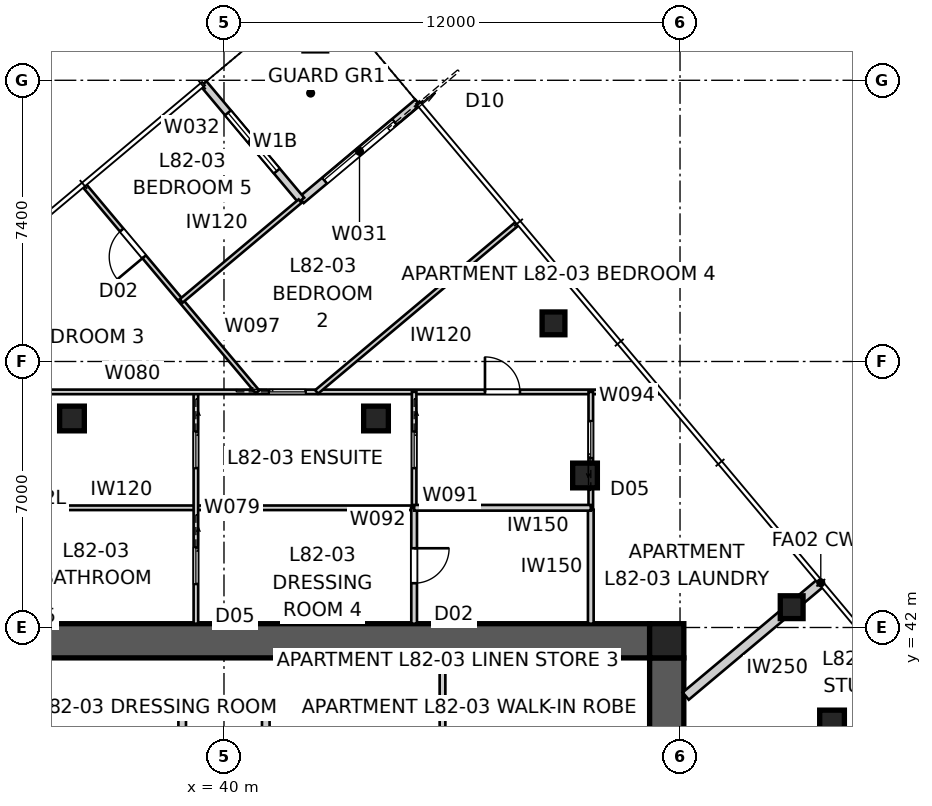
"""IFC4 building model, lengths in metres.
Left out: names, types, materials, properties, quantities, classifications, styles, units other than length and angle.
Written with IfcOpenShell. Run it as: python <this file> out.ifc"""

import sys

from ifc_helpers import new_model, si_unit, direction, frame, frame_2d, origin, origin_2d, place, context, subcontext, project, spatial, polyline, rectangle, outline, extrude, element, fill, save


model = new_model("IFC4")
c1 = context("Model", 3, precision=1e-05, world=origin(), true_north=direction((0.0, 1.0)))
c2 = subcontext(c1, "Body", "Model", "MODEL_VIEW")
j1 = project(units=[si_unit("LENGTHUNIT", "METRE"), si_unit("PLANEANGLEUNIT", "RADIAN")], contexts=[c1])
p1 = place(None, origin())
s1 = spatial("IfcSite", under=j1, at=p1, CompositionType="ELEMENT")
p2 = place(p1, origin())
s2 = spatial("IfcBuilding", under=s1, at=p2, CompositionType="ELEMENT")
p3 = place(p2, frame((0.0, 0.0, 296.4)))
s3 = spatial("IfcBuildingStorey", under=s2, at=p3, CompositionType="ELEMENT", Elevation=296.4)
p4 = place(p3, frame((28.8, 41.65, 0.0), z_axis=(0.0, 0.0, 1.0), x_axis=(1.0, 0.0, 0.0)))
e1 = element("IfcWall", 1, at=p4, inside=s3, PredefinedType="SHEAR", context=c2, shape_type="SweptSolid", body=[
    extrude(outline(polyline([(0.0, -0.45), (22.4, -0.45), (22.4, -0.025), (22.85, -0.025), (22.85, 0.025), (22.4, 0.025), (22.4, 0.45), (0.0, 0.45), (0.0, 0.025), (-0.45, 0.025), (-0.45, -0.025), (0.0, -0.025), (0.0, -0.45)])), origin(), (0.0, 0.0, 1.0), 3.4),
])
p5 = place(p3, frame((51.65, 18.8, 0.0), z_axis=(0.0, 0.0, 1.0), x_axis=(0.0, 1.0, 0.0)))
e2 = element("IfcWall", 2, at=p5, inside=s3, PredefinedType="SHEAR", context=c2, shape_type="SweptSolid", body=[
    extrude(outline(polyline([(0.0, -0.45), (22.4, -0.45), (22.4, -0.025), (22.85, -0.025), (22.85, 0.025), (22.4, 0.025), (22.4, 0.45), (0.0, 0.45), (0.0, 0.025), (-0.45, 0.025), (-0.45, -0.025), (0.0, -0.025), (0.0, -0.45)])), origin(), (0.0, 0.0, 1.0), 3.4),
])
p6 = place(p5, frame((11.14, 0.0, 0.0)))
e3 = element("IfcOpeningElement", 3, at=p6, cuts=e2, PredefinedType="OPENING", context=c2, shape_type="SweptSolid", body=[
    extrude(rectangle(XDim=1.02, YDim=2.4, at=frame_2d((0.51, 1.2))), frame((0.0, 0.46, 0.0), z_axis=(0.0, -1.0, 0.0), x_axis=(1.0, 0.0, 0.0)), (0.0, 0.0, 1.0), 0.92),
])
for number, where, z_axis, x_axis in (
    (4, (38.9, 37.6, 0.0), (0.0, 0.0, 1.0), (0.0, 1.0, 0.0)),
    (5, (41.1, 37.6, 0.0), (0.0, 0.0, 1.0), (0.0, 1.0, 0.0)),
):
    element("IfcWall", number, at=place(p3, frame(where, z_axis=z_axis, x_axis=x_axis)), inside=s3, PredefinedType="SOLIDWALL", context=c2, shape_type="SweptSolid", body=[
        extrude(rectangle(XDim=2.0, YDim=0.2, at=frame_2d((1.0, 0.0))), origin(), (0.0, 0.0, 1.0), 3.4),
    ])
p7 = place(p3, frame((38.8, 39.7, 0.0), z_axis=(0.0, 0.0, 1.0), x_axis=(1.0, 0.0, 0.0)))
e6 = element("IfcWall", 6, at=p7, inside=s3, PredefinedType="SOLIDWALL", context=c2, shape_type="SweptSolid", body=[
    extrude(rectangle(XDim=2.4, YDim=0.2, at=frame_2d((1.2, 0.0))), origin(), (0.0, 0.0, 1.0), 3.4),
])
p8 = place(p3, frame((51.65, 41.65, 0.0), z_axis=(0.0, 0.0, 1.0), x_axis=(1.0, 0.0, 0.0)))
e7 = element("IfcColumn", 7, at=p8, inside=s3, PredefinedType="COLUMN", context=c2, shape_type="SweptSolid", body=[
    extrude(rectangle(XDim=0.9, YDim=0.9, at=origin_2d()), origin(), (0.0, 0.0, 1.0), 3.4),
])
for number, where, z_axis, x_axis in (
    (8, (54.938, 42.534, 0.0), (0.0, 0.0, 1.0), (1.0, 0.0, 0.0)),
    (9, (48.671, 50.003, 0.0), (0.0, 0.0, 1.0), (1.0, 0.0, 0.0)),
):
    element("IfcColumn", number, at=place(p3, frame(where, z_axis=z_axis, x_axis=x_axis)), inside=s3, PredefinedType="COLUMN", context=c2, shape_type="SweptSolid", body=[
        extrude(rectangle(XDim=0.6, YDim=0.6, at=origin_2d()), origin(), (0.0, 0.0, 1.0), 3.4),
    ])
for number, where, z_axis, x_axis in (
    (10, (56.0, 39.5, 0.0), (0.0, 0.0, 1.0), (1.0, 0.0, 0.0)),
    (11, (49.5, 46.0, 0.0), (0.0, 0.0, 1.0), (1.0, 0.0, 0.0)),
    (12, (44.0, 47.5, 0.0), (0.0, 0.0, 1.0), (1.0, 0.0, 0.0)),
    (13, (36.0, 47.5, 0.0), (0.0, 0.0, 1.0), (1.0, 0.0, 0.0)),
):
    element("IfcColumn", number, at=place(p3, frame(where, z_axis=z_axis, x_axis=x_axis)), inside=s3, PredefinedType="COLUMN", context=c2, shape_type="SweptSolid", body=[
        extrude(rectangle(XDim=0.65, YDim=0.65, at=origin_2d()), origin(), (0.0, 0.0, 1.0), 3.4),
    ])
p9 = place(p3, frame((45.098, 55.817, 0.0), z_axis=(0.0, 0.0, 1.0), x_axis=(-0.766060656284, -0.642768287094, 0.0)))
e14 = element("IfcWall", 14, at=p9, inside=s3, PredefinedType="SOLIDWALL", context=c2, shape_type="SweptSolid", body=[
    extrude(rectangle(XDim=4.0, YDim=0.2, at=frame_2d((2.0, 0.0))), origin(), (0.0, 0.0, 1.0), 3.2),
])
p10 = place(p9, frame((0.8, 0.0, 0.0)))
e15 = element("IfcOpeningElement", 15, at=p10, cuts=e14, PredefinedType="OPENING", context=c2, shape_type="SweptSolid", body=[
    extrude(rectangle(XDim=2.4, YDim=2.4, at=frame_2d((1.2, 1.2))), frame((0.0, 0.11, 0.0), z_axis=(0.0, -1.0, 0.0), x_axis=(1.0, 0.0, 0.0)), (0.0, 0.0, 1.0), 0.22),
])
p11 = place(p3, frame((42.034, 53.246, 0.0), z_axis=(0.0, 0.0, 1.0), x_axis=(-0.642798342015, 0.766035437498, 0.0)))
e16 = element("IfcWall", 16, at=p11, inside=s3, PredefinedType="SOLIDWALL", context=c2, shape_type="SweptSolid", body=[
    extrude(rectangle(XDim=4.0, YDim=0.2, at=frame_2d((2.0, 0.0))), origin(), (0.0, 0.0, 1.0), 3.2),
])
p12 = place(p11, frame((1.0, 0.0, 0.45)))
e17 = element("IfcOpeningElement", 17, at=p12, cuts=e16, PredefinedType="OPENING", context=c2, shape_type="SweptSolid", body=[
    extrude(rectangle(XDim=2.0, YDim=1.8, at=frame_2d((1.0, 0.9))), frame((0.0, 0.11, 0.0), z_axis=(0.0, -1.0, 0.0), x_axis=(1.0, 0.0, 0.0)), (0.0, 0.0, 1.0), 0.22),
])
p13 = place(p3, frame((55.704, 43.177, 0.0), z_axis=(0.0, 0.0, 1.0), x_axis=(-0.76603440109, -0.64279957712, 0.0)))
e18 = element("IfcWall", 18, at=p13, inside=s3, PredefinedType="PARTITIONING", context=c2, shape_type="SweptSolid", body=[
    extrude(rectangle(XDim=4.64, YDim=0.25, at=frame_2d((2.32, 0.0))), origin(), (0.0, 0.0, 1.0), 3.2),
])
p14 = place(p3, frame((45.75, 41.2, 0.0), z_axis=(0.0, 0.0, 1.0), x_axis=(0.0, -1.0, 0.0)))
e19 = element("IfcWall", 19, at=p14, inside=s3, PredefinedType="SOLIDWALL", context=c2, shape_type="SweptSolid", body=[
    extrude(rectangle(XDim=5.9, YDim=0.15, at=frame_2d((2.95, 0.0))), origin(), (0.0, 0.0, 1.0), 3.2),
])
p15 = place(p3, frame((34.0, 45.15, 0.0), z_axis=(0.0, 0.0, 1.0), x_axis=(1.0, 0.0, 0.0)))
e20 = element("IfcWall", 20, at=p15, inside=s3, PredefinedType="PARTITIONING", context=c2, shape_type="SweptSolid", body=[
    extrude(rectangle(XDim=11.003, YDim=0.12, at=frame_2d((5.501, 0.0))), origin(), (0.0, 0.0, 1.0), 3.2),
])
p16 = place(p3, frame((39.26, 48.2, 0.0), z_axis=(0.0, 0.0, 1.0), x_axis=(0.0, -1.0, 0.0)))
e21 = element("IfcWall", 21, at=p16, inside=s3, PredefinedType="PARTITIONING", context=c2, shape_type="SweptSolid", body=[
    extrude(rectangle(XDim=6.1, YDim=0.12, at=frame_2d((3.05, 0.0))), origin(), (0.0, 0.0, 1.0), 3.2),
])
p17 = place(p16, frame((1.045, 0.0, 0.0)))
e22 = element("IfcOpeningElement", 22, at=p17, cuts=e21, PredefinedType="OPENING", context=c2, shape_type="SweptSolid", body=[
    extrude(rectangle(XDim=0.96, YDim=2.1, at=frame_2d((0.48, 1.05))), frame((0.0, 0.07, 0.0), z_axis=(0.0, -1.0, 0.0), x_axis=(1.0, 0.0, 0.0)), (0.0, 0.0, 1.0), 0.14),
])
p18 = place(p16, frame((4.095, 0.0, 0.0)))
e23 = element("IfcOpeningElement", 23, at=p18, cuts=e21, PredefinedType="OPENING", context=c2, shape_type="SweptSolid", body=[
    extrude(rectangle(XDim=0.96, YDim=2.1, at=frame_2d((0.48, 1.05))), frame((0.0, 0.07, 0.0), z_axis=(0.0, -1.0, 0.0), x_axis=(1.0, 0.0, 0.0)), (0.0, 0.0, 1.0), 0.14),
])
p19 = place(p3, frame((34.0, 48.2, 0.0), z_axis=(0.0, 0.0, 1.0), x_axis=(1.0, 0.0, 0.0)))
e24 = element("IfcWall", 24, at=p19, inside=s3, PredefinedType="PARTITIONING", context=c2, shape_type="SweptSolid", body=[
    extrude(rectangle(XDim=17.437, YDim=0.12, at=frame_2d((8.718, 0.0))), origin(), (0.0, 0.0, 1.0), 3.2),
])
p20 = place(p19, frame((7.186, 0.0, 0.0)))
e25 = element("IfcOpeningElement", 25, at=p20, cuts=e24, PredefinedType="OPENING", context=c2, shape_type="SweptSolid", body=[
    extrude(rectangle(XDim=0.96, YDim=2.1, at=frame_2d((0.48, 1.05))), frame((0.0, 0.07, 0.0), z_axis=(0.0, -1.0, 0.0), x_axis=(1.0, 0.0, 0.0)), (0.0, 0.0, 1.0), 0.14),
])
p21 = place(p19, frame((12.867, 0.0, 0.0)))
e26 = element("IfcOpeningElement", 26, at=p21, cuts=e24, PredefinedType="OPENING", context=c2, shape_type="SweptSolid", body=[
    extrude(rectangle(XDim=0.92, YDim=2.34, at=frame_2d((0.46, 1.17))), frame((0.0, 0.07, 0.0), z_axis=(0.0, -1.0, 0.0), x_axis=(1.0, 0.0, 0.0)), (0.0, 0.0, 1.0), 0.14),
])
p22 = place(p3, frame((45.003, 48.2, 0.0), z_axis=(0.0, 0.0, 1.0), x_axis=(0.0, -1.0, 0.0)))
e27 = element("IfcWall", 27, at=p22, inside=s3, PredefinedType="PARTITIONING", context=c2, shape_type="SweptSolid", body=[
    extrude(rectangle(XDim=3.05, YDim=0.12, at=frame_2d((1.525, 0.0))), origin(), (0.0, 0.0, 1.0), 3.2),
])
p23 = place(p22, frame((1.045, 0.0, 0.0)))
e28 = element("IfcOpeningElement", 28, at=p23, cuts=e27, PredefinedType="OPENING", context=c2, shape_type="SweptSolid", body=[
    extrude(rectangle(XDim=0.96, YDim=2.1, at=frame_2d((0.48, 1.05))), frame((0.0, 0.07, 0.0), z_axis=(0.0, -1.0, 0.0), x_axis=(1.0, 0.0, 0.0)), (0.0, 0.0, 1.0), 0.14),
])
p24 = place(p3, frame((45.003, 45.15, 0.0), z_axis=(0.0, 0.0, 1.0), x_axis=(0.0, -1.0, 0.0)))
e29 = element("IfcWall", 29, at=p24, inside=s3, PredefinedType="SOLIDWALL", context=c2, shape_type="SweptSolid", body=[
    extrude(rectangle(XDim=3.05, YDim=0.15, at=frame_2d((1.525, 0.0))), origin(), (0.0, 0.0, 1.0), 3.2),
])
p25 = place(p24, frame((1.065, 0.0, 0.0)))
e30 = element("IfcOpeningElement", 30, at=p25, cuts=e29, PredefinedType="OPENING", context=c2, shape_type="SweptSolid", body=[
    extrude(rectangle(XDim=0.92, YDim=2.34, at=frame_2d((0.46, 1.17))), frame((0.0, 0.085, 0.0), z_axis=(0.0, -1.0, 0.0), x_axis=(1.0, 0.0, 0.0)), (0.0, 0.0, 1.0), 0.17),
])
p26 = place(p3, frame((49.652, 42.1, 0.0), z_axis=(0.0, 0.0, 1.0), x_axis=(0.0, 1.0, 0.0)))
e31 = element("IfcWall", 31, at=p26, inside=s3, PredefinedType="SOLIDWALL", context=c2, shape_type="SweptSolid", body=[
    extrude(rectangle(XDim=3.0, YDim=0.15, at=frame_2d((1.5, 0.0))), origin(), (0.0, 0.0, 1.0), 3.2),
])
p27 = place(p3, frame((49.652, 45.1, 0.0), z_axis=(0.0, 0.0, 1.0), x_axis=(0.0, 1.0, 0.0)))
e32 = element("IfcWall", 32, at=p27, inside=s3, PredefinedType="PARTITIONING", context=c2, shape_type="SweptSolid", body=[
    extrude(rectangle(XDim=3.1, YDim=0.12, at=frame_2d((1.55, 0.0))), origin(), (0.0, 0.0, 1.0), 3.2),
])
p28 = place(p27, frame((1.37, 0.0, 0.0)))
e33 = element("IfcOpeningElement", 33, at=p28, cuts=e32, PredefinedType="OPENING", context=c2, shape_type="SweptSolid", body=[
    extrude(rectangle(XDim=0.96, YDim=2.1, at=frame_2d((0.48, 1.05))), frame((0.0, 0.07, 0.0), z_axis=(0.0, -1.0, 0.0), x_axis=(1.0, 0.0, 0.0)), (0.0, 0.0, 1.0), 0.14),
])
p29 = place(p3, frame((45.003, 45.15, 0.0), z_axis=(0.0, 0.0, 1.0), x_axis=(1.0, 0.0, 0.0)))
e34 = element("IfcWall", 34, at=p29, inside=s3, PredefinedType="SOLIDWALL", context=c2, shape_type="SweptSolid", body=[
    extrude(rectangle(XDim=4.649, YDim=0.15, at=frame_2d((2.324, 0.0))), origin(), (0.0, 0.0, 1.0), 3.2),
])
p30 = place(p3, frame((40.883, 48.2, 0.0), z_axis=(0.0, 0.0, 1.0), x_axis=(-0.642790379821, 0.766042118691, 0.0)))
e35 = element("IfcWall", 35, at=p30, inside=s3, PredefinedType="PARTITIONING", context=c2, shape_type="SweptSolid", body=[
    extrude(rectangle(XDim=7.085, YDim=0.12, at=frame_2d((3.543, 0.0))), origin(), (0.0, 0.0, 1.0), 3.2),
])
p31 = place(p30, frame((4.64, 0.0, 0.0)))
e36 = element("IfcOpeningElement", 36, at=p31, cuts=e35, PredefinedType="OPENING", context=c2, shape_type="SweptSolid", body=[
    extrude(rectangle(XDim=0.92, YDim=2.34, at=frame_2d((0.46, 1.17))), frame((0.0, 0.07, 0.0), z_axis=(0.0, -1.0, 0.0), x_axis=(1.0, 0.0, 0.0)), (0.0, 0.0, 1.0), 0.14),
])
p32 = place(p3, frame((47.719, 52.631, 0.0), z_axis=(0.0, 0.0, 1.0), x_axis=(-0.766036842262, -0.642796667926, 0.0)))
e37 = element("IfcWall", 37, at=p32, inside=s3, PredefinedType="PARTITIONING", context=c2, shape_type="SweptSolid", body=[
    extrude(rectangle(XDim=6.894, YDim=0.12, at=frame_2d((3.447, 0.0))), origin(), (0.0, 0.0, 1.0), 3.2),
])
p33 = place(p3, frame((38.874, 50.594, 0.0), z_axis=(0.0, 0.0, 1.0), x_axis=(0.766061483953, 0.642767300664, 0.0)))
e38 = element("IfcWall", 38, at=p33, inside=s3, PredefinedType="PARTITIONING", context=c2, shape_type="SweptSolid", body=[
    extrude(rectangle(XDim=4.085, YDim=0.12, at=frame_2d((2.042, 0.0))), origin(), (0.0, 0.0, 1.0), 3.2),
])
p34 = place(p10, origin())
e39 = element("IfcDoor", 39, at=p34, inside=s3, OperationType="SLIDING_TO_LEFT", PredefinedType="DOOR", context=c2, shape_type="SweptSolid", body=[
    extrude(rectangle(XDim=2.4, YDim=2.4, at=frame_2d((1.2, 1.2))), frame((0.0, 0.025, 0.0), z_axis=(0.0, -1.0, 0.0), x_axis=(1.0, 0.0, 0.0)), (0.0, 0.0, 1.0), 0.05),
])
fill(e15, e39)
p35 = place(p12, origin())
e40 = element("IfcWindow", 40, at=p35, inside=s3, PartitioningType="SINGLE_PANEL", PredefinedType="WINDOW", context=c2, shape_type="SweptSolid", body=[
    extrude(rectangle(XDim=2.0, YDim=1.8, at=frame_2d((1.0, 0.9))), frame((0.0, 0.03, 0.0), z_axis=(0.0, -1.0, 0.0), x_axis=(1.0, 0.0, 0.0)), (0.0, 0.0, 1.0), 0.06),
])
fill(e17, e40)
p36 = place(p17, origin())
e41 = element("IfcDoor", 41, at=p36, inside=s3, OperationType="SLIDING_TO_LEFT", PredefinedType="DOOR", context=c2, shape_type="SweptSolid", body=[
    extrude(rectangle(XDim=0.96, YDim=2.1, at=frame_2d((0.48, 1.05))), frame((0.0, 0.025, 0.0), z_axis=(0.0, -1.0, 0.0), x_axis=(1.0, 0.0, 0.0)), (0.0, 0.0, 1.0), 0.05),
])
fill(e22, e41)
p37 = place(p18, origin())
e42 = element("IfcDoor", 42, at=p37, inside=s3, OperationType="SLIDING_TO_LEFT", PredefinedType="DOOR", context=c2, shape_type="SweptSolid", body=[
    extrude(rectangle(XDim=0.96, YDim=2.1, at=frame_2d((0.48, 1.05))), frame((0.0, 0.025, 0.0), z_axis=(0.0, -1.0, 0.0), x_axis=(1.0, 0.0, 0.0)), (0.0, 0.0, 1.0), 0.05),
])
fill(e23, e42)
p38 = place(p23, origin())
e43 = element("IfcDoor", 43, at=p38, inside=s3, OperationType="SLIDING_TO_LEFT", PredefinedType="DOOR", context=c2, shape_type="SweptSolid", body=[
    extrude(rectangle(XDim=0.96, YDim=2.1, at=frame_2d((0.48, 1.05))), frame((0.0, 0.025, 0.0), z_axis=(0.0, -1.0, 0.0), x_axis=(1.0, 0.0, 0.0)), (0.0, 0.0, 1.0), 0.05),
])
fill(e28, e43)
p39 = place(p20, origin())
e44 = element("IfcDoor", 44, at=p39, inside=s3, OperationType="SLIDING_TO_LEFT", PredefinedType="DOOR", context=c2, shape_type="SweptSolid", body=[
    extrude(rectangle(XDim=0.96, YDim=2.1, at=frame_2d((0.48, 1.05))), frame((0.0, 0.025, 0.0), z_axis=(0.0, -1.0, 0.0), x_axis=(1.0, 0.0, 0.0)), (0.0, 0.0, 1.0), 0.05),
])
fill(e25, e44)
p40 = place(p25, origin())
e45 = element("IfcDoor", 45, at=p40, inside=s3, OperationType="SINGLE_SWING_LEFT", PredefinedType="DOOR", context=c2, shape_type="SweptSolid", body=[
    extrude(rectangle(XDim=0.92, YDim=2.34, at=frame_2d((0.46, 1.17))), frame((0.0, 0.025, 0.0), z_axis=(0.0, -1.0, 0.0), x_axis=(1.0, 0.0, 0.0)), (0.0, 0.0, 1.0), 0.05),
])
fill(e30, e45)
p41 = place(p21, origin())
e46 = element("IfcDoor", 46, at=p41, inside=s3, OperationType="SINGLE_SWING_LEFT", PredefinedType="DOOR", context=c2, shape_type="SweptSolid", body=[
    extrude(rectangle(XDim=0.92, YDim=2.34, at=frame_2d((0.46, 1.17))), frame((0.0, 0.025, 0.0), z_axis=(0.0, -1.0, 0.0), x_axis=(1.0, 0.0, 0.0)), (0.0, 0.0, 1.0), 0.05),
])
fill(e26, e46)
p42 = place(p28, origin())
e47 = element("IfcDoor", 47, at=p42, inside=s3, OperationType="SLIDING_TO_LEFT", PredefinedType="DOOR", context=c2, shape_type="SweptSolid", body=[
    extrude(rectangle(XDim=0.96, YDim=2.1, at=frame_2d((0.48, 1.05))), frame((0.0, 0.025, 0.0), z_axis=(0.0, -1.0, 0.0), x_axis=(1.0, 0.0, 0.0)), (0.0, 0.0, 1.0), 0.05),
])
fill(e33, e47)
p43 = place(p31, origin())
e48 = element("IfcDoor", 48, at=p43, inside=s3, OperationType="SINGLE_SWING_LEFT", PredefinedType="DOOR", context=c2, shape_type="SweptSolid", body=[
    extrude(rectangle(XDim=0.92, YDim=2.34, at=frame_2d((0.46, 1.17))), frame((0.0, 0.025, 0.0), z_axis=(0.0, -1.0, 0.0), x_axis=(1.0, 0.0, 0.0)), (0.0, 0.0, 1.0), 0.05),
])
fill(e36, e48)
save(model, sys.argv[1])
